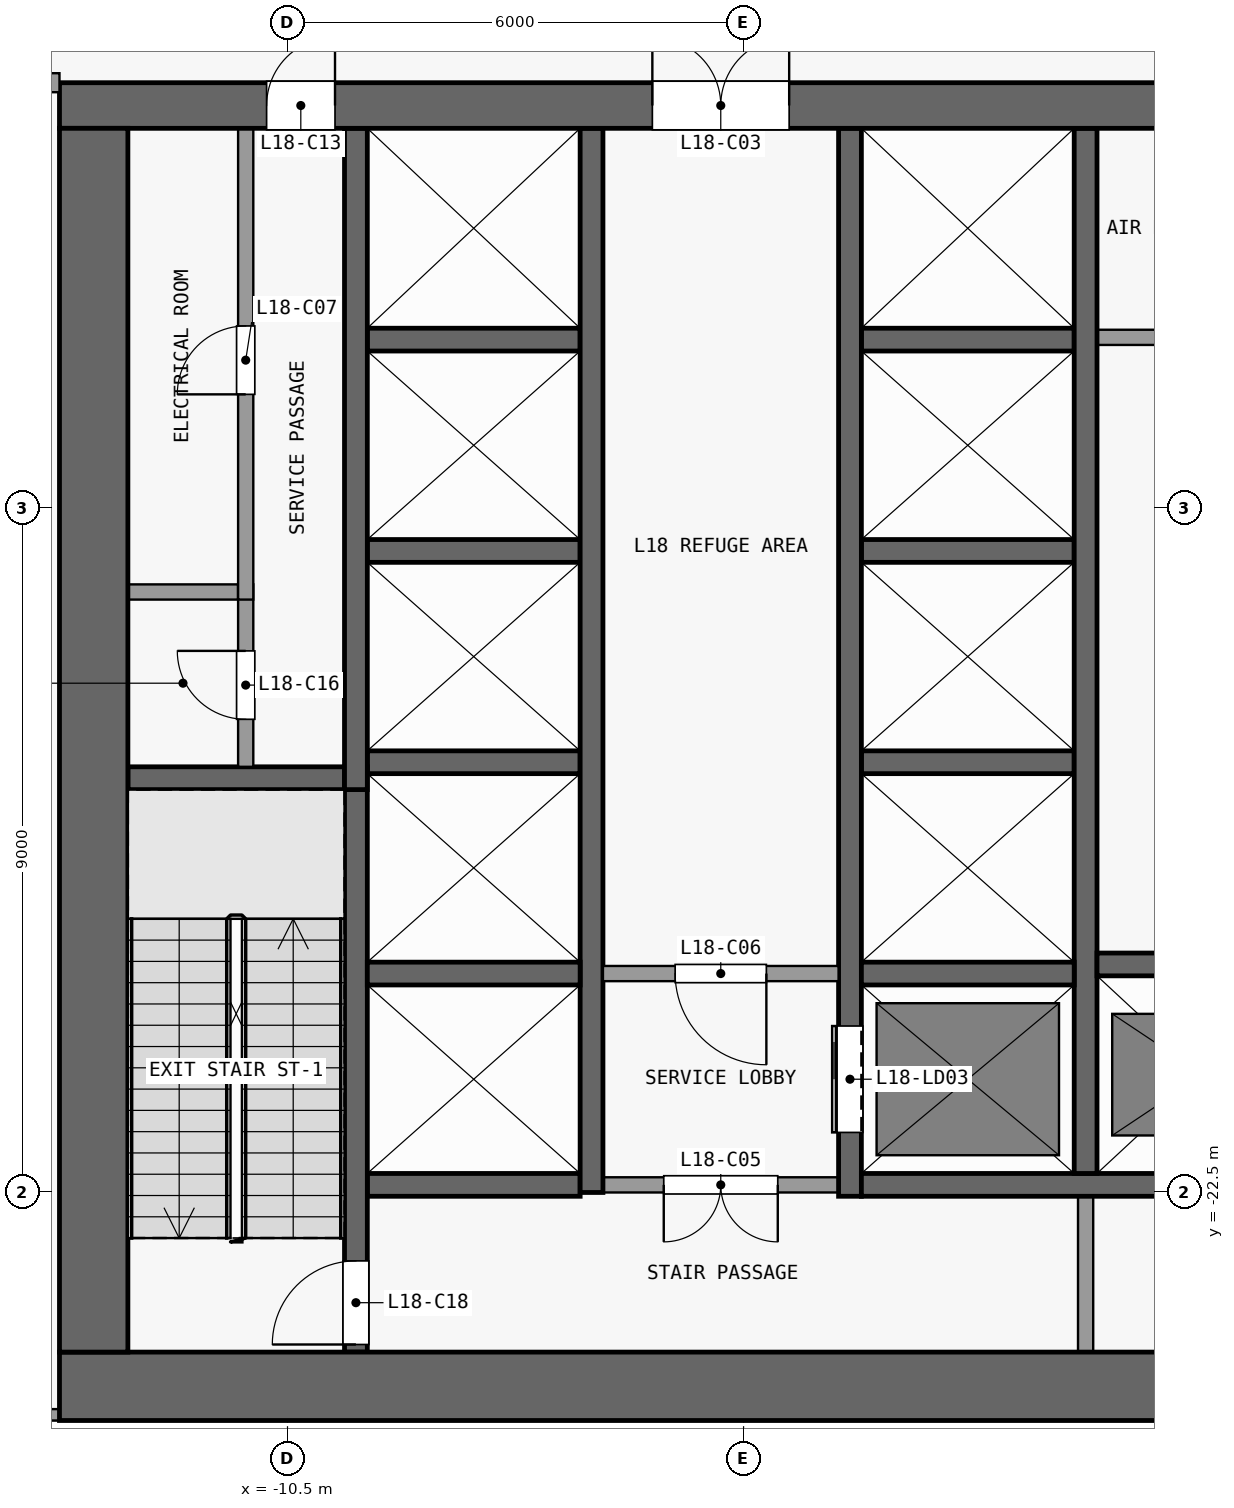
"""IFC4 building model, lengths in metres.
Left out: names, types, materials, properties, quantities, classifications, styles, units other than length and angle.
Written with IfcOpenShell. Run it as: python <this file> out.ifc"""

import sys

from ifc_helpers import new_model, si_unit, direction, frame, frame_2d, origin, place, context, subcontext, project, spatial, rectangle, extrude, element, fill, save


model = new_model("IFC4")
c1 = context("Model", 3, precision=1e-05, world=origin(), true_north=direction((0.0, 1.0)))
c2 = subcontext(c1, "Body", "Model", "MODEL_VIEW")
j1 = project(units=[si_unit("LENGTHUNIT", "METRE"), si_unit("PLANEANGLEUNIT", "RADIAN")], contexts=[c1])
p1 = place(None, origin())
s1 = spatial("IfcSite", under=j1, at=p1, CompositionType="ELEMENT")
p2 = place(p1, origin())
s2 = spatial("IfcBuilding", under=s1, at=p2, CompositionType="ELEMENT")
p3 = place(p2, frame((0.0, 0.0, 75.7)))
s3 = spatial("IfcBuildingStorey", under=s2, at=p3, CompositionType="ELEMENT", Elevation=75.7)
p4 = place(p3, frame((-13.5, -25.05, 0.0), z_axis=(0.0, 0.0, 1.0), x_axis=(1.0, 0.0, 0.0)))
e1 = element("IfcWall", 1, at=p4, inside=s3, PredefinedType="SHEAR", context=c2, shape_type="SweptSolid", body=[
    extrude(rectangle(XDim=27.0, YDim=0.9, at=frame_2d((13.5, 0.0))), origin(), (0.0, 0.0, 1.0), 5.0),
])
p5 = place(p3, frame((-13.5, -8.2, 0.0), z_axis=(0.0, 0.0, 1.0), x_axis=(1.0, 0.0, 0.0)))
e2 = element("IfcWall", 2, at=p5, inside=s3, PredefinedType="SHEAR", context=c2, shape_type="SweptSolid", body=[
    extrude(rectangle(XDim=27.0, YDim=0.6, at=frame_2d((13.5, 0.0))), origin(), (0.0, 0.0, 1.0), 5.0),
])
p6 = place(p5, frame((7.8, 0.0, 0.0)))
e3 = element("IfcOpeningElement", 3, at=p6, cuts=e2, PredefinedType="OPENING", context=c2, shape_type="SweptSolid", body=[
    extrude(rectangle(XDim=1.8, YDim=2.1, at=frame_2d((0.9, 1.05))), frame((0.0, 0.31, 0.0), z_axis=(0.0, -1.0, 0.0), x_axis=(1.0, 0.0, 0.0)), (0.0, 0.0, 1.0), 0.62),
])
p7 = place(p5, frame((17.4, 0.0, 0.0)))
e4 = element("IfcOpeningElement", 4, at=p7, cuts=e2, PredefinedType="OPENING", context=c2, shape_type="SweptSolid", body=[
    extrude(rectangle(XDim=1.8, YDim=2.1, at=frame_2d((0.9, 1.05))), frame((0.0, 0.31, 0.0), z_axis=(0.0, -1.0, 0.0), x_axis=(1.0, 0.0, 0.0)), (0.0, 0.0, 1.0), 0.62),
])
p8 = place(p5, frame((2.725, 0.0, 0.0)))
e5 = element("IfcOpeningElement", 5, at=p8, cuts=e2, PredefinedType="OPENING", context=c2, shape_type="SweptSolid", body=[
    extrude(rectangle(XDim=0.9, YDim=2.1, at=frame_2d((0.45, 1.05))), frame((0.0, 0.31, 0.0), z_axis=(0.0, -1.0, 0.0), x_axis=(1.0, 0.0, 0.0)), (0.0, 0.0, 1.0), 0.62),
])
p9 = place(p5, frame((23.375, 0.0, 0.0)))
e6 = element("IfcOpeningElement", 6, at=p9, cuts=e2, PredefinedType="OPENING", context=c2, shape_type="SweptSolid", body=[
    extrude(rectangle(XDim=0.9, YDim=2.1, at=frame_2d((0.45, 1.05))), frame((0.0, 0.31, 0.0), z_axis=(0.0, -1.0, 0.0), x_axis=(1.0, 0.0, 0.0)), (0.0, 0.0, 1.0), 0.62),
])
p10 = place(p3, frame((-13.05, -24.6, 0.0), z_axis=(0.0, 0.0, 1.0), x_axis=(0.0, 1.0, 0.0)))
e7 = element("IfcWall", 7, at=p10, inside=s3, PredefinedType="SHEAR", context=c2, shape_type="SweptSolid", body=[
    extrude(rectangle(XDim=16.1, YDim=0.9, at=frame_2d((8.05, 0.0))), origin(), (0.0, 0.0, 1.0), 5.0),
])
p11 = place(p3, frame((-9.45, -22.4, 0.0), z_axis=(0.0, 0.0, 1.0), x_axis=(1.0, 0.0, 0.0)))
e8 = element("IfcWall", 8, at=p11, inside=s3, PredefinedType="SHEAR", context=c2, shape_type="SweptSolid", body=[
    extrude(rectangle(XDim=2.8, YDim=0.3, at=frame_2d((1.4, 0.0))), origin(), (0.0, 0.0, 1.0), 5.0),
])
p12 = place(p3, frame((-3.25, -22.4, 0.0), z_axis=(0.0, 0.0, 1.0), x_axis=(-1.0, 0.0, 0.0)))
e9 = element("IfcWall", 9, at=p12, inside=s3, PredefinedType="PARTITIONING", context=c2, shape_type="SweptSolid", body=[
    extrude(rectangle(XDim=3.1, YDim=0.2, at=frame_2d((1.55, 0.0))), origin(), (0.0, 0.0, 1.0), 5.0),
])
p13 = place(p12, frame((0.8, 0.0, 0.0)))
e10 = element("IfcOpeningElement", 10, at=p13, cuts=e9, PredefinedType="OPENING", context=c2, shape_type="SweptSolid", body=[
    extrude(rectangle(XDim=1.5, YDim=2.1, at=frame_2d((0.75, 1.05))), frame((0.0, 0.11, 0.0), z_axis=(0.0, -1.0, 0.0), x_axis=(1.0, 0.0, 0.0)), (0.0, 0.0, 1.0), 0.22),
])
p14 = place(p3, frame((-2.95, -22.4, 0.0), z_axis=(0.0, 0.0, 1.0), x_axis=(1.0, 0.0, 0.0)))
e11 = element("IfcWall", 11, at=p14, inside=s3, PredefinedType="SHEAR", context=c2, shape_type="SweptSolid", body=[
    extrude(rectangle(XDim=6.2, YDim=0.3, at=frame_2d((3.1, 0.0))), origin(), (0.0, 0.0, 1.0), 5.0),
])
p15 = place(p3, frame((-9.45, -19.62, 0.0), z_axis=(0.0, 0.0, 1.0), x_axis=(1.0, 0.0, 0.0)))
e12 = element("IfcWall", 12, at=p15, inside=s3, PredefinedType="SHEAR", context=c2, shape_type="SweptSolid", body=[
    extrude(rectangle(XDim=2.8, YDim=0.3, at=frame_2d((1.4, 0.0))), origin(), (0.0, 0.0, 1.0), 5.0),
])
p16 = place(p3, frame((-3.25, -19.62, 0.0), z_axis=(0.0, 0.0, 1.0), x_axis=(-1.0, 0.0, 0.0)))
e13 = element("IfcWall", 13, at=p16, inside=s3, PredefinedType="PARTITIONING", context=c2, shape_type="SweptSolid", body=[
    extrude(rectangle(XDim=3.1, YDim=0.2, at=frame_2d((1.55, 0.0))), origin(), (0.0, 0.0, 1.0), 5.0),
])
p17 = place(p16, frame((0.95, 0.0, 0.0)))
e14 = element("IfcOpeningElement", 14, at=p17, cuts=e13, PredefinedType="OPENING", context=c2, shape_type="SweptSolid", body=[
    extrude(rectangle(XDim=1.2, YDim=2.1, at=frame_2d((0.6, 1.05))), frame((0.0, 0.11, 0.0), z_axis=(0.0, -1.0, 0.0), x_axis=(1.0, 0.0, 0.0)), (0.0, 0.0, 1.0), 0.22),
])
p18 = place(p3, frame((-2.95, -19.62, 0.0), z_axis=(0.0, 0.0, 1.0), x_axis=(1.0, 0.0, 0.0)))
e15 = element("IfcWall", 15, at=p18, inside=s3, PredefinedType="SHEAR", context=c2, shape_type="SweptSolid", body=[
    extrude(rectangle(XDim=2.8, YDim=0.3, at=frame_2d((1.4, 0.0))), origin(), (0.0, 0.0, 1.0), 5.0),
])
p19 = place(p3, frame((0.15, -19.5, 0.0), z_axis=(0.0, 0.0, 1.0), x_axis=(1.0, 0.0, 0.0)))
e16 = element("IfcWall", 16, at=p19, inside=s3, PredefinedType="SHEAR", context=c2, shape_type="SweptSolid", body=[
    extrude(rectangle(XDim=3.05, YDim=0.3, at=frame_2d((1.525, 0.0))), origin(), (0.0, 0.0, 1.0), 5.0),
])
p20 = place(p3, frame((-12.6, -17.05, 0.0), z_axis=(0.0, 0.0, 1.0), x_axis=(1.0, 0.0, 0.0)))
e17 = element("IfcWall", 17, at=p20, inside=s3, PredefinedType="SHEAR", context=c2, shape_type="SweptSolid", body=[
    extrude(rectangle(XDim=2.85, YDim=0.3, at=frame_2d((1.425, 0.0))), origin(), (0.0, 0.0, 1.0), 5.0),
])
for number, where, z_axis, x_axis in (
    (18, (-9.45, -16.84, 0.0), (0.0, 0.0, 1.0), (1.0, 0.0, 0.0)),
    (19, (-2.95, -16.84, 0.0), (0.0, 0.0, 1.0), (1.0, 0.0, 0.0)),
):
    element("IfcWall", number, at=place(p3, frame(where, z_axis=z_axis, x_axis=x_axis)), inside=s3, PredefinedType="SHEAR", context=c2, shape_type="SweptSolid", body=[
        extrude(rectangle(XDim=2.8, YDim=0.3, at=frame_2d((1.4, 0.0))), origin(), (0.0, 0.0, 1.0), 5.0),
    ])
p21 = place(p3, frame((-12.6, -14.6, 0.0), z_axis=(0.0, 0.0, 1.0), x_axis=(1.0, 0.0, 0.0)))
e20 = element("IfcWall", 20, at=p21, inside=s3, PredefinedType="PARTITIONING", context=c2, shape_type="SweptSolid", body=[
    extrude(rectangle(XDim=1.45, YDim=0.2, at=frame_2d((0.725, 0.0))), origin(), (0.0, 0.0, 1.0), 5.0),
])
for number, where, z_axis, x_axis in (
    (21, (-9.45, -14.06, 0.0), (0.0, 0.0, 1.0), (1.0, 0.0, 0.0)),
    (22, (-2.95, -14.06, 0.0), (0.0, 0.0, 1.0), (1.0, 0.0, 0.0)),
    (23, (-9.45, -11.28, 0.0), (0.0, 0.0, 1.0), (1.0, 0.0, 0.0)),
    (24, (-2.95, -11.28, 0.0), (0.0, 0.0, 1.0), (1.0, 0.0, 0.0)),
):
    element("IfcWall", number, at=place(p3, frame(where, z_axis=z_axis, x_axis=x_axis)), inside=s3, PredefinedType="SHEAR", context=c2, shape_type="SweptSolid", body=[
        extrude(rectangle(XDim=2.8, YDim=0.3, at=frame_2d((1.4, 0.0))), origin(), (0.0, 0.0, 1.0), 5.0),
    ])
p22 = place(p3, frame((0.15, -11.25, 0.0), z_axis=(0.0, 0.0, 1.0), x_axis=(1.0, 0.0, 0.0)))
e25 = element("IfcWall", 25, at=p22, inside=s3, PredefinedType="PARTITIONING", context=c2, shape_type="SweptSolid", body=[
    extrude(rectangle(XDim=2.85, YDim=0.2, at=frame_2d((1.425, 0.0))), origin(), (0.0, 0.0, 1.0), 5.0),
])
p23 = place(p3, frame((-11.05, -16.9, 0.0), z_axis=(0.0, 0.0, 1.0), x_axis=(0.0, 1.0, 0.0)))
e26 = element("IfcWall", 26, at=p23, inside=s3, PredefinedType="PARTITIONING", context=c2, shape_type="SweptSolid", body=[
    extrude(rectangle(XDim=2.4, YDim=0.2, at=frame_2d((1.2, 0.0))), origin(), (0.0, 0.0, 1.0), 5.0),
])
p24 = place(p23, frame((0.625, 0.0, 0.0)))
e27 = element("IfcOpeningElement", 27, at=p24, cuts=e26, PredefinedType="OPENING", context=c2, shape_type="SweptSolid", body=[
    extrude(rectangle(XDim=0.9, YDim=2.1, at=frame_2d((0.45, 1.05))), frame((0.0, 0.11, 0.0), z_axis=(0.0, -1.0, 0.0), x_axis=(1.0, 0.0, 0.0)), (0.0, 0.0, 1.0), 0.22),
])
p25 = place(p3, frame((-11.05, -14.7, 0.0), z_axis=(0.0, 0.0, 1.0), x_axis=(0.0, 1.0, 0.0)))
e28 = element("IfcWall", 28, at=p25, inside=s3, PredefinedType="PARTITIONING", context=c2, shape_type="SweptSolid", body=[
    extrude(rectangle(XDim=6.2, YDim=0.2, at=frame_2d((3.1, 0.0))), origin(), (0.0, 0.0, 1.0), 5.0),
])
p26 = place(p25, frame((2.7, 0.0, 0.0)))
e29 = element("IfcOpeningElement", 29, at=p26, cuts=e28, PredefinedType="OPENING", context=c2, shape_type="SweptSolid", body=[
    extrude(rectangle(XDim=0.9, YDim=2.1, at=frame_2d((0.45, 1.05))), frame((0.0, 0.11, 0.0), z_axis=(0.0, -1.0, 0.0), x_axis=(1.0, 0.0, 0.0)), (0.0, 0.0, 1.0), 0.22),
])
p27 = place(p3, frame((-9.6, -24.6, 0.0), z_axis=(0.0, 0.0, 1.0), x_axis=(0.0, 1.0, 0.0)))
e30 = element("IfcWall", 30, at=p27, inside=s3, PredefinedType="SHEAR", context=c2, shape_type="SweptSolid", body=[
    extrude(rectangle(XDim=7.7, YDim=0.3, at=frame_2d((3.85, 0.0))), origin(), (0.0, 0.0, 1.0), 5.0),
])
p28 = place(p27, frame((0.1, 0.0, 0.0)))
e31 = element("IfcOpeningElement", 31, at=p28, cuts=e30, PredefinedType="OPENING", context=c2, shape_type="SweptSolid", body=[
    extrude(rectangle(XDim=1.1, YDim=2.1, at=frame_2d((0.55, 1.05))), frame((0.0, 0.16, 0.0), z_axis=(0.0, -1.0, 0.0), x_axis=(1.0, 0.0, 0.0)), (0.0, 0.0, 1.0), 0.32),
])
p29 = place(p3, frame((-9.6, -17.2, 0.0), z_axis=(0.0, 0.0, 1.0), x_axis=(0.0, 1.0, 0.0)))
e32 = element("IfcWall", 32, at=p29, inside=s3, PredefinedType="SHEAR", context=c2, shape_type="SweptSolid", body=[
    extrude(rectangle(XDim=8.7, YDim=0.3, at=frame_2d((4.35, 0.0))), origin(), (0.0, 0.0, 1.0), 5.0),
])
p30 = place(p3, frame((-6.5, -22.5, 0.0), z_axis=(0.0, 0.0, 1.0), x_axis=(0.0, 1.0, 0.0)))
e33 = element("IfcWall", 33, at=p30, inside=s3, PredefinedType="SHEAR", context=c2, shape_type="SweptSolid", body=[
    extrude(rectangle(XDim=14.0, YDim=0.3, at=frame_2d((7.0, 0.0))), origin(), (0.0, 0.0, 1.0), 5.0),
])
p31 = place(p3, frame((-3.1, -22.55, 0.0), z_axis=(0.0, 0.0, 1.0), x_axis=(0.0, 1.0, 0.0)))
e34 = element("IfcWall", 34, at=p31, inside=s3, PredefinedType="SHEAR", context=c2, shape_type="SweptSolid", body=[
    extrude(rectangle(XDim=14.05, YDim=0.3, at=frame_2d((7.025, 0.0))), origin(), (0.0, 0.0, 1.0), 5.0),
])
p32 = place(p31, frame((0.84, 0.0, 0.0)))
e35 = element("IfcOpeningElement", 35, at=p32, cuts=e34, PredefinedType="OPENING", context=c2, shape_type="SweptSolid", body=[
    extrude(rectangle(XDim=1.4, YDim=2.1, at=frame_2d((0.7, 1.05))), frame((0.0, 0.16, 0.0), z_axis=(0.0, -1.0, 0.0), x_axis=(1.0, 0.0, 0.0)), (0.0, 0.0, 1.0), 0.32),
])
p33 = place(p3, frame((0.0, -24.6, 0.0), z_axis=(0.0, 0.0, 1.0), x_axis=(0.0, 1.0, 0.0)))
e36 = element("IfcWall", 36, at=p33, inside=s3, PredefinedType="PARTITIONING", context=c2, shape_type="SweptSolid", body=[
    extrude(rectangle(XDim=2.05, YDim=0.2, at=frame_2d((1.025, 0.0))), origin(), (0.0, 0.0, 1.0), 5.0),
])
p34 = place(p3, frame((0.0, -22.25, 0.0), z_axis=(0.0, 0.0, 1.0), x_axis=(0.0, 1.0, 0.0)))
e37 = element("IfcWall", 37, at=p34, inside=s3, PredefinedType="SHEAR", context=c2, shape_type="SweptSolid", body=[
    extrude(rectangle(XDim=13.75, YDim=0.3, at=frame_2d((6.875, 0.0))), origin(), (0.0, 0.0, 1.0), 5.0),
])
p35 = place(p3, frame((-13.5, -25.425, 0.0), z_axis=(0.0, 0.0, 1.0), x_axis=(-1.0, 0.0, 0.0)))
e38 = element("IfcWall", 38, at=p35, inside=s3, PredefinedType="SOLIDWALL", context=c2, shape_type="SweptSolid", body=[
    extrude(rectangle(XDim=9.0, YDim=0.15, at=frame_2d((4.5, 0.0))), origin(), (0.0, 0.0, 1.0), 5.0),
])
p36 = place(p35, frame((4.2, 0.0, 1.2)))
e39 = element("IfcOpeningElement", 39, at=p36, cuts=e38, PredefinedType="OPENING", context=c2, shape_type="SweptSolid", body=[
    extrude(rectangle(XDim=3.6, YDim=3.0, at=frame_2d((1.8, 1.5))), frame((0.0, 0.085, 0.0), z_axis=(0.0, -1.0, 0.0), x_axis=(1.0, 0.0, 0.0)), (0.0, 0.0, 1.0), 0.17),
])
p37 = place(p35, frame((0.5, 0.0, 1.2)))
e40 = element("IfcOpeningElement", 40, at=p37, cuts=e38, PredefinedType="OPENING", context=c2, shape_type="SweptSolid", body=[
    extrude(rectangle(XDim=2.0, YDim=3.0, at=frame_2d((1.0, 1.5))), frame((0.0, 0.085, 0.0), z_axis=(0.0, -1.0, 0.0), x_axis=(1.0, 0.0, 0.0)), (0.0, 0.0, 1.0), 0.17),
])
p38 = place(p3, frame((-25.35, -7.9, 0.0), z_axis=(0.0, 0.0, 1.0), x_axis=(1.0, 0.0, 0.0)))
e41 = element("IfcWall", 41, at=p38, inside=s3, PredefinedType="PARTITIONING", context=c2, shape_type="SweptSolid", body=[
    extrude(rectangle(XDim=11.85, YDim=0.25, at=frame_2d((5.925, 0.0))), origin(), (0.0, 0.0, 1.0), 5.0),
])
p39 = place(p38, frame((5.3, 0.0, 0.0)))
e42 = element("IfcOpeningElement", 42, at=p39, cuts=e41, PredefinedType="OPENING", context=c2, shape_type="SweptSolid", body=[
    extrude(rectangle(XDim=1.2, YDim=2.1, at=frame_2d((0.6, 1.05))), frame((0.0, 0.135, 0.0), z_axis=(0.0, -1.0, 0.0), x_axis=(1.0, 0.0, 0.0)), (0.0, 0.0, 1.0), 0.27),
])
p40 = place(p32, origin())
e43 = element("IfcDoor", 43, at=p40, inside=s3, OperationType="DOUBLE_DOOR_SLIDING", PredefinedType="DOOR", context=c2, shape_type="SweptSolid", body=[
    extrude(rectangle(XDim=1.4, YDim=2.1, at=frame_2d((0.7, 1.05))), frame((0.0, 0.025, 0.0), z_axis=(0.0, -1.0, 0.0), x_axis=(1.0, 0.0, 0.0)), (0.0, 0.0, 1.0), 0.05),
])
fill(e35, e43)
p41 = place(p6, origin())
e44 = element("IfcDoor", 44, at=p41, inside=s3, OperationType="DOUBLE_DOOR_SINGLE_SWING", PredefinedType="DOOR", context=c2, shape_type="SweptSolid", body=[
    extrude(rectangle(XDim=1.8, YDim=2.1, at=frame_2d((0.9, 1.05))), frame((0.0, 0.025, 0.0), z_axis=(0.0, -1.0, 0.0), x_axis=(1.0, 0.0, 0.0)), (0.0, 0.0, 1.0), 0.05),
])
fill(e3, e44)
p42 = place(p13, origin())
e45 = element("IfcDoor", 45, at=p42, inside=s3, OperationType="DOUBLE_DOOR_SINGLE_SWING", PredefinedType="DOOR", context=c2, shape_type="SweptSolid", body=[
    extrude(rectangle(XDim=1.5, YDim=2.1, at=frame_2d((0.75, 1.05))), frame((0.0, 0.025, 0.0), z_axis=(0.0, -1.0, 0.0), x_axis=(1.0, 0.0, 0.0)), (0.0, 0.0, 1.0), 0.05),
])
fill(e10, e45)
p43 = place(p17, origin())
e46 = element("IfcDoor", 46, at=p43, inside=s3, OperationType="SINGLE_SWING_LEFT", PredefinedType="DOOR", context=c2, shape_type="SweptSolid", body=[
    extrude(rectangle(XDim=1.2, YDim=2.1, at=frame_2d((0.6, 1.05))), frame((0.0, 0.025, 0.0), z_axis=(0.0, -1.0, 0.0), x_axis=(1.0, 0.0, 0.0)), (0.0, 0.0, 1.0), 0.05),
])
fill(e14, e46)
p44 = place(p26, origin())
e47 = element("IfcDoor", 47, at=p44, inside=s3, OperationType="SINGLE_SWING_LEFT", PredefinedType="DOOR", context=c2, shape_type="SweptSolid", body=[
    extrude(rectangle(XDim=0.9, YDim=2.1, at=frame_2d((0.45, 1.05))), frame((0.0, 0.025, 0.0), z_axis=(0.0, -1.0, 0.0), x_axis=(1.0, 0.0, 0.0)), (0.0, 0.0, 1.0), 0.05),
])
fill(e29, e47)
p45 = place(p8, origin())
e48 = element("IfcDoor", 48, at=p45, inside=s3, OperationType="SINGLE_SWING_RIGHT", PredefinedType="DOOR", context=c2, shape_type="SweptSolid", body=[
    extrude(rectangle(XDim=0.9, YDim=2.1, at=frame_2d((0.45, 1.05))), frame((0.0, 0.025, 0.0), z_axis=(0.0, -1.0, 0.0), x_axis=(1.0, 0.0, 0.0)), (0.0, 0.0, 1.0), 0.05),
])
fill(e5, e48)
p46 = place(p24, origin())
e49 = element("IfcDoor", 49, at=p46, inside=s3, OperationType="SINGLE_SWING_RIGHT", PredefinedType="DOOR", context=c2, shape_type="SweptSolid", body=[
    extrude(rectangle(XDim=0.9, YDim=2.1, at=frame_2d((0.45, 1.05))), frame((0.0, 0.025, 0.0), z_axis=(0.0, -1.0, 0.0), x_axis=(1.0, 0.0, 0.0)), (0.0, 0.0, 1.0), 0.05),
])
fill(e27, e49)
p47 = place(p28, origin())
e50 = element("IfcDoor", 50, at=p47, inside=s3, OperationType="SINGLE_SWING_LEFT", PredefinedType="DOOR", context=c2, shape_type="SweptSolid", body=[
    extrude(rectangle(XDim=1.1, YDim=2.1, at=frame_2d((0.55, 1.05))), frame((0.0, 0.025, 0.0), z_axis=(0.0, -1.0, 0.0), x_axis=(1.0, 0.0, 0.0)), (0.0, 0.0, 1.0), 0.05),
])
fill(e31, e50)
save(model, sys.argv[1])
